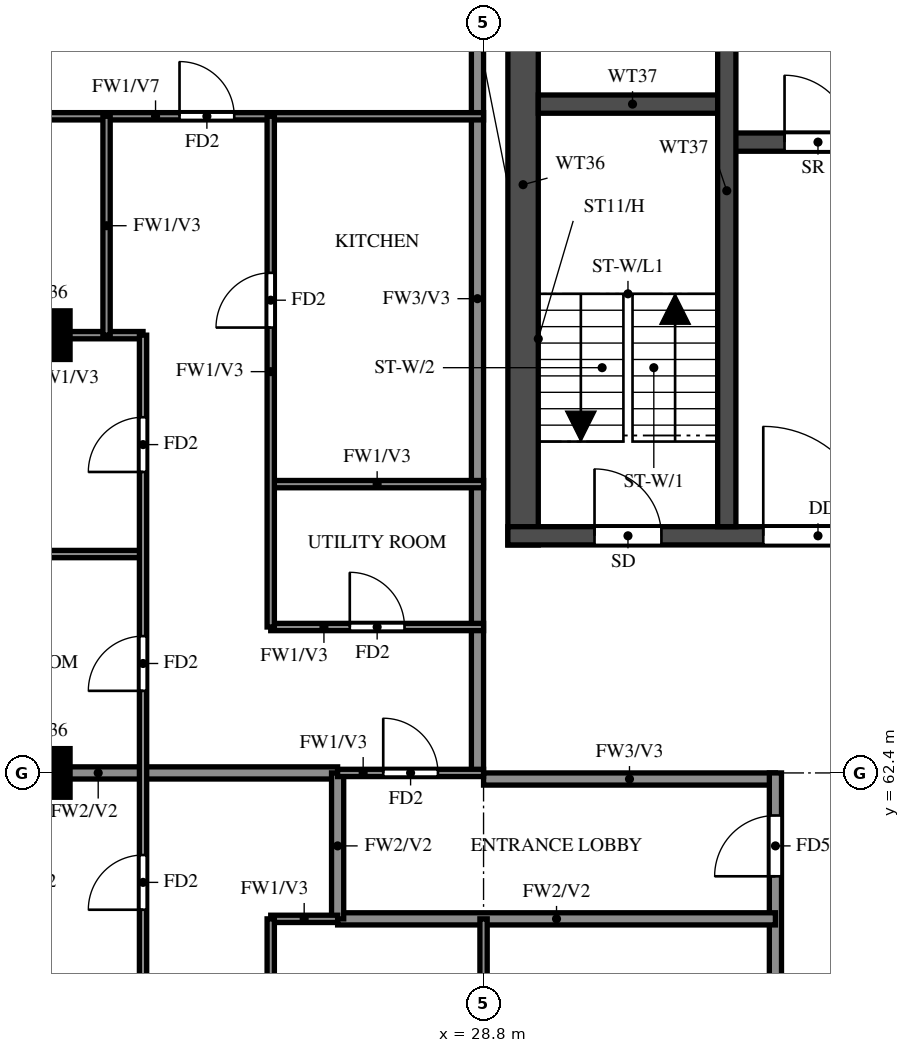
"""IFC4 building model, lengths in metres.
Left out: names, types, materials, properties, quantities, classifications, styles, units other than length and angle.
Written with IfcOpenShell. Run it as: python <this file> out.ifc"""

import sys

from ifc_helpers import new_model, si_unit, direction, frame, frame_2d, origin, origin_2d, place, context, subcontext, project, spatial, rectangle, extrude, source, transform, mapped, element, fill, save


model = new_model("IFC4")
c1 = context("Model", 3, precision=1e-05, world=origin(), true_north=direction((0.0, 1.0)))
c2 = subcontext(c1, "Body", "Model", "MODEL_VIEW")
j1 = project(units=[si_unit("LENGTHUNIT", "METRE"), si_unit("PLANEANGLEUNIT", "RADIAN")], contexts=[c1])
p1 = place(None, origin())
s1 = spatial("IfcSite", under=j1, at=p1, CompositionType="ELEMENT")
p2 = place(p1, origin())
s2 = spatial("IfcBuilding", under=s1, at=p2, CompositionType="ELEMENT")
p3 = place(p2, frame((0.0, 0.0, 243.0)))
s3 = spatial("IfcBuildingStorey", under=s2, at=p3, CompositionType="ELEMENT", Elevation=243.0)
m1 = source(origin(), c2, "Body", "SweptSolid", [
    extrude(rectangle(XDim=0.8, YDim=0.8, at=origin_2d()), origin(), (0.0, 0.0, 1.0), 3.22),
])
for number, where, z_axis, x_axis in (
    (1, (21.6, 62.4, 0.0), (0.0, 0.0, 1.0), (1.0, 0.0, 0.0)),
    (2, (21.6, 69.6, 0.0), (0.0, 0.0, 1.0), (1.0, 0.0, 0.0)),
):
    element("IfcColumn", number, at=place(p3, frame(where, z_axis=z_axis, x_axis=x_axis)), inside=s3, PredefinedType="COLUMN", context=c2, shape_type="MappedRepresentation", body=[
        mapped(m1, transform((0.0, 0.0, 0.0))),
    ])
p4 = place(p3, frame((29.45, 66.15, 0.0), z_axis=(0.0, 0.0, 1.0), x_axis=(0.0, 1.0, 0.0)))
e3 = element("IfcWall", 3, at=p4, inside=s3, PredefinedType="SHEAR", context=c2, shape_type="SweptSolid", body=[
    extrude(rectangle(XDim=11.85, YDim=0.5, at=frame_2d((5.925, 0.0))), origin(), (0.0, 0.0, 1.0), 3.22),
])
p5 = place(p3, frame((29.2, 66.3, 0.0), z_axis=(0.0, 0.0, 1.0), x_axis=(1.0, 0.0, 0.0)))
e4 = element("IfcWall", 4, at=p5, inside=s3, PredefinedType="SHEAR", context=c2, shape_type="SweptSolid", body=[
    extrude(rectangle(XDim=42.4, YDim=0.3, at=frame_2d((21.2, 0.0))), origin(), (0.0, 0.0, 1.0), 3.22),
])
p6 = place(p5, frame((1.425, 0.0, 0.0)))
e5 = element("IfcOpeningElement", 5, at=p6, cuts=e4, PredefinedType="OPENING", context=c2, shape_type="SweptSolid", body=[
    extrude(rectangle(XDim=1.1, YDim=2.1, at=frame_2d((0.55, 1.05))), frame((0.0, 0.16, 0.0), z_axis=(0.0, -1.0, 0.0), x_axis=(1.0, 0.0, 0.0)), (0.0, 0.0, 1.0), 0.32),
])
p7 = place(p5, frame((4.2, 0.0, 0.0)))
e6 = element("IfcOpeningElement", 6, at=p7, cuts=e4, PredefinedType="OPENING", context=c2, shape_type="SweptSolid", body=[
    extrude(rectangle(XDim=1.8, YDim=2.1, at=frame_2d((0.9, 1.05))), frame((0.0, 0.16, 0.0), z_axis=(0.0, -1.0, 0.0), x_axis=(1.0, 0.0, 0.0)), (0.0, 0.0, 1.0), 0.32),
])
p8 = place(p3, frame((32.8, 72.775, 0.0), z_axis=(0.0, 0.0, 1.0), x_axis=(1.0, 0.0, 0.0)))
e7 = element("IfcWall", 7, at=p8, inside=s3, PredefinedType="SHEAR", context=c2, shape_type="SweptSolid", body=[
    extrude(rectangle(XDim=35.2, YDim=0.3, at=frame_2d((17.6, 0.0))), origin(), (0.0, 0.0, 1.0), 3.22),
])
p9 = place(p8, frame((19.8, 0.0, 0.0)))
e8 = element("IfcOpeningElement", 8, at=p9, cuts=e7, PredefinedType="OPENING", context=c2, shape_type="SweptSolid", body=[
    extrude(rectangle(XDim=1.1, YDim=2.1, at=frame_2d((0.55, 1.05))), frame((0.0, 0.16, 0.0), z_axis=(0.0, -1.0, 0.0), x_axis=(1.0, 0.0, 0.0)), (0.0, 0.0, 1.0), 0.32),
])
p10 = place(p8, frame((27.725, 0.0, 0.0)))
e9 = element("IfcOpeningElement", 9, at=p10, cuts=e7, PredefinedType="OPENING", context=c2, shape_type="SweptSolid", body=[
    extrude(rectangle(XDim=1.1, YDim=2.1, at=frame_2d((0.55, 1.05))), frame((0.0, 0.16, 0.0), z_axis=(0.0, -1.0, 0.0), x_axis=(1.0, 0.0, 0.0)), (0.0, 0.0, 1.0), 0.32),
])
p11 = place(p8, frame((30.325, 0.0, 0.0)))
e10 = element("IfcOpeningElement", 10, at=p11, cuts=e7, PredefinedType="OPENING", context=c2, shape_type="SweptSolid", body=[
    extrude(rectangle(XDim=1.1, YDim=2.1, at=frame_2d((0.55, 1.05))), frame((0.0, 0.16, 0.0), z_axis=(0.0, -1.0, 0.0), x_axis=(1.0, 0.0, 0.0)), (0.0, 0.0, 1.0), 0.32),
])
p12 = place(p8, frame((3.825, 0.0, 0.0)))
e11 = element("IfcOpeningElement", 11, at=p12, cuts=e7, PredefinedType="OPENING", context=c2, shape_type="SweptSolid", body=[
    extrude(rectangle(XDim=1.1, YDim=2.1, at=frame_2d((0.55, 1.05))), frame((0.0, 0.16, 0.0), z_axis=(0.0, -1.0, 0.0), x_axis=(1.0, 0.0, 0.0)), (0.0, 0.0, 1.0), 0.32),
])
p13 = place(p8, frame((6.575, 0.0, 0.0)))
e12 = element("IfcOpeningElement", 12, at=p13, cuts=e7, PredefinedType="OPENING", context=c2, shape_type="SweptSolid", body=[
    extrude(rectangle(XDim=1.1, YDim=2.1, at=frame_2d((0.55, 1.05))), frame((0.0, 0.16, 0.0), z_axis=(0.0, -1.0, 0.0), x_axis=(1.0, 0.0, 0.0)), (0.0, 0.0, 1.0), 0.32),
])
p14 = place(p8, frame((9.325, 0.0, 0.0)))
e13 = element("IfcOpeningElement", 13, at=p14, cuts=e7, PredefinedType="OPENING", context=c2, shape_type="SweptSolid", body=[
    extrude(rectangle(XDim=1.1, YDim=2.1, at=frame_2d((0.55, 1.05))), frame((0.0, 0.16, 0.0), z_axis=(0.0, -1.0, 0.0), x_axis=(1.0, 0.0, 0.0)), (0.0, 0.0, 1.0), 0.32),
])
p15 = place(p8, frame((12.075, 0.0, 0.0)))
e14 = element("IfcOpeningElement", 14, at=p15, cuts=e7, PredefinedType="OPENING", context=c2, shape_type="SweptSolid", body=[
    extrude(rectangle(XDim=1.1, YDim=2.1, at=frame_2d((0.55, 1.05))), frame((0.0, 0.16, 0.0), z_axis=(0.0, -1.0, 0.0), x_axis=(1.0, 0.0, 0.0)), (0.0, 0.0, 1.0), 0.32),
])
p16 = place(p8, frame((14.825, 0.0, 0.0)))
e15 = element("IfcOpeningElement", 15, at=p16, cuts=e7, PredefinedType="OPENING", context=c2, shape_type="SweptSolid", body=[
    extrude(rectangle(XDim=1.1, YDim=2.1, at=frame_2d((0.55, 1.05))), frame((0.0, 0.16, 0.0), z_axis=(0.0, -1.0, 0.0), x_axis=(1.0, 0.0, 0.0)), (0.0, 0.0, 1.0), 0.32),
])
p17 = place(p8, frame((17.575, 0.0, 0.0)))
e16 = element("IfcOpeningElement", 16, at=p17, cuts=e7, PredefinedType="OPENING", context=c2, shape_type="SweptSolid", body=[
    extrude(rectangle(XDim=1.1, YDim=2.1, at=frame_2d((0.55, 1.05))), frame((0.0, 0.16, 0.0), z_axis=(0.0, -1.0, 0.0), x_axis=(1.0, 0.0, 0.0)), (0.0, 0.0, 1.0), 0.32),
])
p18 = place(p8, frame((0.95, 0.0, 0.0)))
e17 = element("IfcOpeningElement", 17, at=p18, cuts=e7, PredefinedType="OPENING", context=c2, shape_type="SweptSolid", body=[
    extrude(rectangle(XDim=1.1, YDim=2.1, at=frame_2d((0.55, 1.05))), frame((0.0, 0.16, 0.0), z_axis=(0.0, -1.0, 0.0), x_axis=(1.0, 0.0, 0.0)), (0.0, 0.0, 1.0), 0.32),
])
p19 = place(p3, frame((29.7, 73.4, 0.0), z_axis=(0.0, 0.0, 1.0), x_axis=(1.0, 0.0, 0.0)))
e18 = element("IfcWall", 18, at=p19, inside=s3, PredefinedType="SHEAR", context=c2, shape_type="SweptSolid", body=[
    extrude(rectangle(XDim=3.1, YDim=0.3, at=frame_2d((1.55, 0.0))), origin(), (0.0, 0.0, 1.0), 3.22),
])
p20 = place(p3, frame((32.8, 66.45, 0.0), z_axis=(0.0, 0.0, 1.0), x_axis=(0.0, 1.0, 0.0)))
e19 = element("IfcWall", 19, at=p20, inside=s3, PredefinedType="SHEAR", context=c2, shape_type="SweptSolid", body=[
    extrude(rectangle(XDim=11.05, YDim=0.3, at=frame_2d((5.525, 0.0))), origin(), (0.0, 0.0, 1.0), 3.22),
])
p21 = place(p3, frame((28.8, 62.3, 0.0), z_axis=(0.0, 0.0, 1.0), x_axis=(1.0, 0.0, 0.0)))
e20 = element("IfcWall", 20, at=p21, inside=s3, PredefinedType="SOLIDWALL", context=c2, shape_type="SweptSolid", body=[
    extrude(rectangle(XDim=4.8, YDim=0.2, at=frame_2d((2.4, 0.0))), origin(), (0.0, 0.0, 1.0), 3.22),
])
p22 = place(p3, frame((28.7, 62.4, 0.0), z_axis=(0.0, 0.0, 1.0), x_axis=(0.0, 1.0, 0.0)))
e21 = element("IfcWall", 21, at=p22, inside=s3, PredefinedType="SOLIDWALL", context=c2, shape_type="SweptSolid", body=[
    extrude(rectangle(XDim=15.6, YDim=0.2, at=frame_2d((7.8, 0.0))), origin(), (0.0, 0.0, 1.0), 3.22),
])
p23 = place(p3, frame((33.6, 45.6, 0.0), z_axis=(0.0, 0.0, 1.0), x_axis=(0.0, 1.0, 0.0)))
e22 = element("IfcWall", 22, at=p23, inside=s3, PredefinedType="SOLIDWALL", context=c2, shape_type="SweptSolid", body=[
    extrude(rectangle(XDim=16.8, YDim=0.2, at=frame_2d((8.4, 0.0))), origin(), (0.0, 0.0, 1.0), 3.22),
])
p24 = place(p23, frame((0.7, 0.0, 0.0)))
e23 = element("IfcOpeningElement", 23, at=p24, cuts=e22, PredefinedType="OPENING", context=c2, shape_type="SweptSolid", body=[
    extrude(rectangle(XDim=1.0, YDim=2.1, at=frame_2d((0.5, 1.05))), frame((0.0, 0.11, 0.0), z_axis=(0.0, -1.0, 0.0), x_axis=(1.0, 0.0, 0.0)), (0.0, 0.0, 1.0), 0.22),
])
p25 = place(p23, frame((8.3, 0.0, 0.0)))
e24 = element("IfcOpeningElement", 24, at=p25, cuts=e22, PredefinedType="OPENING", context=c2, shape_type="SweptSolid", body=[
    extrude(rectangle(XDim=1.0, YDim=2.1, at=frame_2d((0.5, 1.05))), frame((0.0, 0.11, 0.0), z_axis=(0.0, -1.0, 0.0), x_axis=(1.0, 0.0, 0.0)), (0.0, 0.0, 1.0), 0.22),
])
p26 = place(p23, frame((15.1, 0.0, 0.0)))
e25 = element("IfcOpeningElement", 25, at=p26, cuts=e22, PredefinedType="OPENING", context=c2, shape_type="SweptSolid", body=[
    extrude(rectangle(XDim=1.0, YDim=2.1, at=frame_2d((0.5, 1.05))), frame((0.0, 0.11, 0.0), z_axis=(0.0, -1.0, 0.0), x_axis=(1.0, 0.0, 0.0)), (0.0, 0.0, 1.0), 0.22),
])
p27 = place(p3, frame((26.4, 60.0, 0.0), z_axis=(0.0, 0.0, 1.0), x_axis=(1.0, 0.0, 0.0)))
e26 = element("IfcWall", 26, at=p27, inside=s3, PredefinedType="SOLIDWALL", context=c2, shape_type="SweptSolid", body=[
    extrude(rectangle(XDim=7.2, YDim=0.2, at=frame_2d((3.6, 0.0))), origin(), (0.0, 0.0, 1.0), 3.22),
])
p28 = place(p3, frame((18.525, 62.4, 0.0), z_axis=(0.0, 0.0, 1.0), x_axis=(1.0, 0.0, 0.0)))
e27 = element("IfcWall", 27, at=p28, inside=s3, PredefinedType="SOLIDWALL", context=c2, shape_type="SweptSolid", body=[
    extrude(rectangle(XDim=7.875, YDim=0.2, at=frame_2d((3.938, 0.0))), origin(), (0.0, 0.0, 1.0), 3.22),
])
p29 = place(p3, frame((26.4, 60.0, 0.0), z_axis=(0.0, 0.0, 1.0), x_axis=(0.0, 1.0, 0.0)))
e28 = element("IfcWall", 28, at=p29, inside=s3, PredefinedType="SOLIDWALL", context=c2, shape_type="SweptSolid", body=[
    extrude(rectangle(XDim=2.4, YDim=0.2, at=frame_2d((1.2, 0.0))), origin(), (0.0, 0.0, 1.0), 3.22),
])
p30 = place(p3, frame((25.3, 60.0, 0.0), z_axis=(0.0, 0.0, 1.0), x_axis=(1.0, 0.0, 0.0)))
e29 = element("IfcWall", 29, at=p30, inside=s3, PredefinedType="PARTITIONING", context=c2, shape_type="SweptSolid", body=[
    extrude(rectangle(XDim=1.1, YDim=0.12, at=frame_2d((0.55, 0.0))), origin(), (0.0, 0.0, 1.0), 3.22),
])
p31 = place(p3, frame((26.4, 62.4, 0.0), z_axis=(0.0, 0.0, 1.0), x_axis=(1.0, 0.0, 0.0)))
e30 = element("IfcWall", 30, at=p31, inside=s3, PredefinedType="PARTITIONING", context=c2, shape_type="SweptSolid", body=[
    extrude(rectangle(XDim=2.4, YDim=0.12, at=frame_2d((1.2, 0.0))), origin(), (0.0, 0.0, 1.0), 3.22),
])
p32 = place(p31, frame((0.75, 0.0, 0.0)))
e31 = element("IfcOpeningElement", 31, at=p32, cuts=e30, PredefinedType="OPENING", context=c2, shape_type="SweptSolid", body=[
    extrude(rectangle(XDim=0.9, YDim=2.1, at=frame_2d((0.45, 1.05))), frame((0.0, 0.07, 0.0), z_axis=(0.0, -1.0, 0.0), x_axis=(1.0, 0.0, 0.0)), (0.0, 0.0, 1.0), 0.14),
])
p33 = place(p3, frame((25.3, 64.8, 0.0), z_axis=(0.0, 0.0, 1.0), x_axis=(1.0, 0.0, 0.0)))
e32 = element("IfcWall", 32, at=p33, inside=s3, PredefinedType="PARTITIONING", context=c2, shape_type="SweptSolid", body=[
    extrude(rectangle(XDim=3.5, YDim=0.12, at=frame_2d((1.75, 0.0))), origin(), (0.0, 0.0, 1.0), 3.22),
])
p34 = place(p33, frame((1.3, 0.0, 0.0)))
e33 = element("IfcOpeningElement", 33, at=p34, cuts=e32, PredefinedType="OPENING", context=c2, shape_type="SweptSolid", body=[
    extrude(rectangle(XDim=0.9, YDim=2.1, at=frame_2d((0.45, 1.05))), frame((0.0, 0.07, 0.0), z_axis=(0.0, -1.0, 0.0), x_axis=(1.0, 0.0, 0.0)), (0.0, 0.0, 1.0), 0.14),
])
p35 = place(p3, frame((18.525, 66.0, 0.0), z_axis=(0.0, 0.0, 1.0), x_axis=(1.0, 0.0, 0.0)))
e34 = element("IfcWall", 34, at=p35, inside=s3, PredefinedType="PARTITIONING", context=c2, shape_type="SweptSolid", body=[
    extrude(rectangle(XDim=4.675, YDim=0.12, at=frame_2d((2.337, 0.0))), origin(), (0.0, 0.0, 1.0), 2.32),
])
p36 = place(p3, frame((25.3, 67.15, 0.0), z_axis=(0.0, 0.0, 1.0), x_axis=(1.0, 0.0, 0.0)))
e35 = element("IfcWall", 35, at=p36, inside=s3, PredefinedType="PARTITIONING", context=c2, shape_type="SweptSolid", body=[
    extrude(rectangle(XDim=3.5, YDim=0.12, at=frame_2d((1.75, 0.0))), origin(), (0.0, 0.0, 1.0), 3.22),
])
p37 = place(p3, frame((18.525, 69.6, 0.0), z_axis=(0.0, 0.0, 1.0), x_axis=(1.0, 0.0, 0.0)))
e36 = element("IfcWall", 36, at=p37, inside=s3, PredefinedType="PARTITIONING", context=c2, shape_type="SweptSolid", body=[
    extrude(rectangle(XDim=4.675, YDim=0.12, at=frame_2d((2.337, 0.0))), origin(), (0.0, 0.0, 1.0), 3.22),
])
p38 = place(p37, frame((1.538, 0.0, 0.0)))
e37 = element("IfcOpeningElement", 37, at=p38, cuts=e36, PredefinedType="OPENING", context=c2, shape_type="SweptSolid", body=[
    extrude(rectangle(XDim=0.8, YDim=2.1, at=frame_2d((0.4, 1.05))), frame((0.0, 0.07, 0.0), z_axis=(0.0, -1.0, 0.0), x_axis=(1.0, 0.0, 0.0)), (0.0, 0.0, 1.0), 0.14),
])
p39 = place(p3, frame((18.525, 73.2, 0.0), z_axis=(0.0, 0.0, 1.0), x_axis=(1.0, 0.0, 0.0)))
e38 = element("IfcWall", 38, at=p39, inside=s3, PredefinedType="PARTITIONING", context=c2, shape_type="SweptSolid", body=[
    extrude(rectangle(XDim=10.275, YDim=0.12, at=frame_2d((5.138, 0.0))), origin(), (0.0, 0.0, 1.0), 2.32),
])
p40 = place(p39, frame((5.275, 0.0, 0.0)))
e39 = element("IfcOpeningElement", 39, at=p40, cuts=e38, PredefinedType="OPENING", context=c2, shape_type="SweptSolid", body=[
    extrude(rectangle(XDim=0.9, YDim=2.1, at=frame_2d((0.45, 1.05))), frame((0.0, 0.07, 0.0), z_axis=(0.0, -1.0, 0.0), x_axis=(1.0, 0.0, 0.0)), (0.0, 0.0, 1.0), 0.14),
])
p41 = place(p3, frame((22.6, 69.6, 0.0), z_axis=(0.0, 0.0, 1.0), x_axis=(0.0, 1.0, 0.0)))
e40 = element("IfcWall", 40, at=p41, inside=s3, PredefinedType="PARTITIONING", context=c2, shape_type="SweptSolid", body=[
    extrude(rectangle(XDim=3.6, YDim=0.12, at=frame_2d((1.8, 0.0))), origin(), (0.0, 0.0, 1.0), 3.22),
])
p42 = place(p3, frame((23.2, 48.0, 0.0), z_axis=(0.0, 0.0, 1.0), x_axis=(0.0, 1.0, 0.0)))
e41 = element("IfcWall", 41, at=p42, inside=s3, PredefinedType="PARTITIONING", context=c2, shape_type="SweptSolid", body=[
    extrude(rectangle(XDim=21.6, YDim=0.12, at=frame_2d((10.8, 0.0))), origin(), (0.0, 0.0, 1.0), 3.22),
])
p43 = place(p42, frame((1.35, 0.0, 0.0)))
e42 = element("IfcOpeningElement", 42, at=p43, cuts=e41, PredefinedType="OPENING", context=c2, shape_type="SweptSolid", body=[
    extrude(rectangle(XDim=0.9, YDim=2.1, at=frame_2d((0.45, 1.05))), frame((0.0, 0.07, 0.0), z_axis=(0.0, -1.0, 0.0), x_axis=(1.0, 0.0, 0.0)), (0.0, 0.0, 1.0), 0.14),
])
p44 = place(p42, frame((7.95, 0.0, 0.0)))
e43 = element("IfcOpeningElement", 43, at=p44, cuts=e41, PredefinedType="OPENING", context=c2, shape_type="SweptSolid", body=[
    extrude(rectangle(XDim=1.5, YDim=2.1, at=frame_2d((0.75, 1.05))), frame((0.0, 0.07, 0.0), z_axis=(0.0, -1.0, 0.0), x_axis=(1.0, 0.0, 0.0)), (0.0, 0.0, 1.0), 0.14),
])
p45 = place(p42, frame((12.15, 0.0, 0.0)))
e44 = element("IfcOpeningElement", 44, at=p45, cuts=e41, PredefinedType="OPENING", context=c2, shape_type="SweptSolid", body=[
    extrude(rectangle(XDim=0.9, YDim=2.1, at=frame_2d((0.45, 1.05))), frame((0.0, 0.07, 0.0), z_axis=(0.0, -1.0, 0.0), x_axis=(1.0, 0.0, 0.0)), (0.0, 0.0, 1.0), 0.14),
])
p46 = place(p42, frame((15.75, 0.0, 0.0)))
e45 = element("IfcOpeningElement", 45, at=p46, cuts=e41, PredefinedType="OPENING", context=c2, shape_type="SweptSolid", body=[
    extrude(rectangle(XDim=0.9, YDim=2.1, at=frame_2d((0.45, 1.05))), frame((0.0, 0.07, 0.0), z_axis=(0.0, -1.0, 0.0), x_axis=(1.0, 0.0, 0.0)), (0.0, 0.0, 1.0), 0.14),
])
p47 = place(p42, frame((19.35, 0.0, 0.0)))
e46 = element("IfcOpeningElement", 46, at=p47, cuts=e41, PredefinedType="OPENING", context=c2, shape_type="SweptSolid", body=[
    extrude(rectangle(XDim=0.9, YDim=2.1, at=frame_2d((0.45, 1.05))), frame((0.0, 0.07, 0.0), z_axis=(0.0, -1.0, 0.0), x_axis=(1.0, 0.0, 0.0)), (0.0, 0.0, 1.0), 0.14),
])
p48 = place(p3, frame((25.3, 55.6, 0.0), z_axis=(0.0, 0.0, 1.0), x_axis=(0.0, 1.0, 0.0)))
e47 = element("IfcWall", 47, at=p48, inside=s3, PredefinedType="PARTITIONING", context=c2, shape_type="SweptSolid", body=[
    extrude(rectangle(XDim=4.4, YDim=0.12, at=frame_2d((2.2, 0.0))), origin(), (0.0, 0.0, 1.0), 3.22),
])
p49 = place(p48, frame((1.8, 0.0, 0.0)))
e48 = element("IfcOpeningElement", 48, at=p49, cuts=e47, PredefinedType="OPENING", context=c2, shape_type="SweptSolid", body=[
    extrude(rectangle(XDim=0.8, YDim=2.1, at=frame_2d((0.4, 1.05))), frame((0.0, 0.07, 0.0), z_axis=(0.0, -1.0, 0.0), x_axis=(1.0, 0.0, 0.0)), (0.0, 0.0, 1.0), 0.14),
])
p50 = place(p3, frame((25.3, 64.8, 0.0), z_axis=(0.0, 0.0, 1.0), x_axis=(0.0, 1.0, 0.0)))
e49 = element("IfcWall", 49, at=p50, inside=s3, PredefinedType="PARTITIONING", context=c2, shape_type="SweptSolid", body=[
    extrude(rectangle(XDim=8.4, YDim=0.12, at=frame_2d((4.2, 0.0))), origin(), (0.0, 0.0, 1.0), 3.22),
])
p51 = place(p50, frame((4.925, 0.0, 0.0)))
e50 = element("IfcOpeningElement", 50, at=p51, cuts=e49, PredefinedType="OPENING", context=c2, shape_type="SweptSolid", body=[
    extrude(rectangle(XDim=0.9, YDim=2.1, at=frame_2d((0.45, 1.05))), frame((0.0, 0.07, 0.0), z_axis=(0.0, -1.0, 0.0), x_axis=(1.0, 0.0, 0.0)), (0.0, 0.0, 1.0), 0.14),
])
p52 = place(p3, frame((28.8, 55.6, 0.0), z_axis=(0.0, 0.0, 1.0), x_axis=(0.0, 1.0, 0.0)))
e51 = element("IfcWall", 51, at=p52, inside=s3, PredefinedType="PARTITIONING", context=c2, shape_type="SweptSolid", body=[
    extrude(rectangle(XDim=4.4, YDim=0.12, at=frame_2d((2.2, 0.0))), origin(), (0.0, 0.0, 1.0), 3.22),
])
p53 = place(p6, origin())
e52 = element("IfcDoor", 52, at=p53, inside=s3, OperationType="SINGLE_SWING_LEFT", PredefinedType="DOOR", context=c2, shape_type="SweptSolid", body=[
    extrude(rectangle(XDim=1.1, YDim=2.1, at=frame_2d((0.55, 1.05))), frame((0.0, 0.025, 0.0), z_axis=(0.0, -1.0, 0.0), x_axis=(1.0, 0.0, 0.0)), (0.0, 0.0, 1.0), 0.05),
])
fill(e5, e52)
p54 = place(p7, origin())
e53 = element("IfcDoor", 53, at=p54, inside=s3, OperationType="DOUBLE_DOOR_SINGLE_SWING", PredefinedType="DOOR", context=c2, shape_type="SweptSolid", body=[
    extrude(rectangle(XDim=1.8, YDim=2.1, at=frame_2d((0.9, 1.05))), frame((0.0, 0.025, 0.0), z_axis=(0.0, -1.0, 0.0), x_axis=(1.0, 0.0, 0.0)), (0.0, 0.0, 1.0), 0.05),
])
fill(e6, e53)
p55 = place(p18, origin())
e54 = element("IfcDoor", 54, at=p55, inside=s3, OperationType="SINGLE_SWING_LEFT", PredefinedType="DOOR", context=c2, shape_type="SweptSolid", body=[
    extrude(rectangle(XDim=1.1, YDim=2.1, at=frame_2d((0.55, 1.05))), frame((0.0, 0.025, 0.0), z_axis=(0.0, -1.0, 0.0), x_axis=(1.0, 0.0, 0.0)), (0.0, 0.0, 1.0), 0.05),
])
fill(e17, e54)
p56 = place(p45, origin())
e55 = element("IfcDoor", 55, at=p56, inside=s3, OperationType="SINGLE_SWING_RIGHT", PredefinedType="DOOR", context=c2, shape_type="SweptSolid", body=[
    extrude(rectangle(XDim=0.9, YDim=2.1, at=frame_2d((0.45, 1.05))), frame((0.0, 0.025, 0.0), z_axis=(0.0, -1.0, 0.0), x_axis=(1.0, 0.0, 0.0)), (0.0, 0.0, 1.0), 0.05),
])
fill(e44, e55)
p57 = place(p32, origin())
e56 = element("IfcDoor", 56, at=p57, inside=s3, OperationType="SINGLE_SWING_RIGHT", PredefinedType="DOOR", context=c2, shape_type="SweptSolid", body=[
    extrude(rectangle(XDim=0.9, YDim=2.1, at=frame_2d((0.45, 1.05))), frame((0.0, 0.025, 0.0), z_axis=(0.0, -1.0, 0.0), x_axis=(1.0, 0.0, 0.0)), (0.0, 0.0, 1.0), 0.05),
])
fill(e31, e56)
p58 = place(p26, origin())
e57 = element("IfcDoor", 57, at=p58, inside=s3, OperationType="SINGLE_SWING_LEFT", PredefinedType="DOOR", context=c2, shape_type="SweptSolid", body=[
    extrude(rectangle(XDim=1.0, YDim=2.1, at=frame_2d((0.5, 1.05))), frame((0.0, 0.025, 0.0), z_axis=(0.0, -1.0, 0.0), x_axis=(1.0, 0.0, 0.0)), (0.0, 0.0, 1.0), 0.05),
])
fill(e25, e57)
p59 = place(p46, origin())
e58 = element("IfcDoor", 58, at=p59, inside=s3, OperationType="SINGLE_SWING_LEFT", PredefinedType="DOOR", context=c2, shape_type="SweptSolid", body=[
    extrude(rectangle(XDim=0.9, YDim=2.1, at=frame_2d((0.45, 1.05))), frame((0.0, 0.025, 0.0), z_axis=(0.0, -1.0, 0.0), x_axis=(1.0, 0.0, 0.0)), (0.0, 0.0, 1.0), 0.05),
])
fill(e45, e58)
p60 = place(p47, origin())
e59 = element("IfcDoor", 59, at=p60, inside=s3, OperationType="SINGLE_SWING_RIGHT", PredefinedType="DOOR", context=c2, shape_type="SweptSolid", body=[
    extrude(rectangle(XDim=0.9, YDim=2.1, at=frame_2d((0.45, 1.05))), frame((0.0, 0.025, 0.0), z_axis=(0.0, -1.0, 0.0), x_axis=(1.0, 0.0, 0.0)), (0.0, 0.0, 1.0), 0.05),
])
fill(e46, e59)
p61 = place(p40, origin())
e60 = element("IfcDoor", 60, at=p61, inside=s3, OperationType="SINGLE_SWING_LEFT", PredefinedType="DOOR", context=c2, shape_type="SweptSolid", body=[
    extrude(rectangle(XDim=0.9, YDim=2.1, at=frame_2d((0.45, 1.05))), frame((0.0, 0.025, 0.0), z_axis=(0.0, -1.0, 0.0), x_axis=(1.0, 0.0, 0.0)), (0.0, 0.0, 1.0), 0.05),
])
fill(e39, e60)
p62 = place(p34, origin())
e61 = element("IfcDoor", 61, at=p62, inside=s3, OperationType="SINGLE_SWING_RIGHT", PredefinedType="DOOR", context=c2, shape_type="SweptSolid", body=[
    extrude(rectangle(XDim=0.9, YDim=2.1, at=frame_2d((0.45, 1.05))), frame((0.0, 0.025, 0.0), z_axis=(0.0, -1.0, 0.0), x_axis=(1.0, 0.0, 0.0)), (0.0, 0.0, 1.0), 0.05),
])
fill(e33, e61)
p63 = place(p51, origin())
e62 = element("IfcDoor", 62, at=p63, inside=s3, OperationType="SINGLE_SWING_LEFT", PredefinedType="DOOR", context=c2, shape_type="SweptSolid", body=[
    extrude(rectangle(XDim=0.9, YDim=2.1, at=frame_2d((0.45, 1.05))), frame((0.0, 0.025, 0.0), z_axis=(0.0, -1.0, 0.0), x_axis=(1.0, 0.0, 0.0)), (0.0, 0.0, 1.0), 0.05),
])
fill(e50, e62)
save(model, sys.argv[1])
